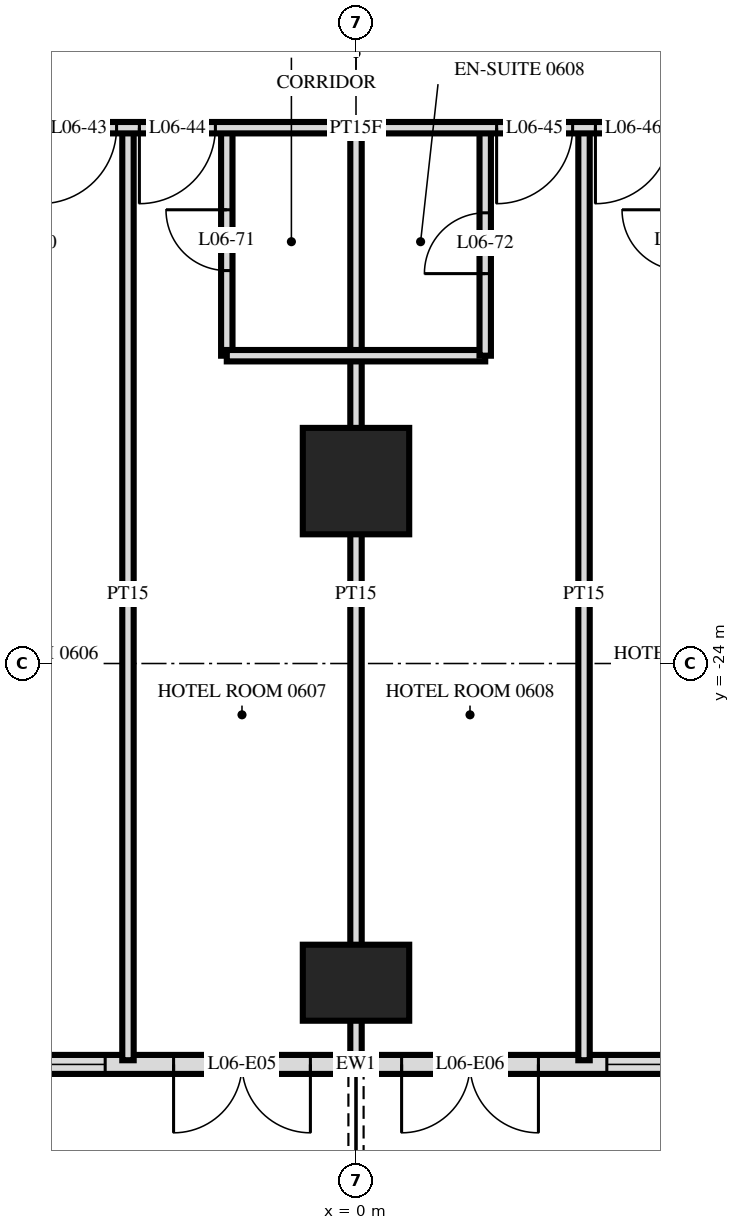
"""IFC4 building model, lengths in metres.
Left out: names, types, materials, properties, quantities, classifications, styles, units other than length and angle.
Written with IfcOpenShell. Run it as: python <this file> out.ifc"""

import sys

from ifc_helpers import new_model, si_unit, direction, frame, frame_2d, origin, origin_2d, place, context, subcontext, project, spatial, rectangle, extrude, element, fill, save


model = new_model("IFC4")
c1 = context("Model", 3, precision=1e-05, world=origin(), true_north=direction((0.0, 1.0)))
c2 = subcontext(c1, "Body", "Model", "MODEL_VIEW")
j1 = project(units=[si_unit("LENGTHUNIT", "METRE"), si_unit("PLANEANGLEUNIT", "RADIAN")], contexts=[c1])
p1 = place(None, origin())
s1 = spatial("IfcSite", under=j1, at=p1, CompositionType="ELEMENT")
p2 = place(p1, origin())
s2 = spatial("IfcBuilding", under=s1, at=p2, CompositionType="ELEMENT")
p3 = place(p2, frame((0.0, 0.0, 31.2)))
s3 = spatial("IfcBuildingStorey", under=s2, at=p3, CompositionType="ELEMENT", Elevation=31.2)
p4 = place(p3, frame((0.0, -28.2, 0.0), z_axis=(0.0, 0.0, 1.0), x_axis=(1.0, 0.0, 0.0)))
e1 = element("IfcColumn", 1, at=p4, inside=s3, PredefinedType="COLUMN", context=c2, shape_type="SweptSolid", body=[
    extrude(rectangle(XDim=1.4, YDim=1.0, at=origin_2d()), origin(), (0.0, 0.0, 1.0), 3.6),
])
p5 = place(p3, frame((0.0, -21.6, 0.0), z_axis=(0.0, 0.0, 1.0), x_axis=(1.0, 0.0, 0.0)))
e2 = element("IfcColumn", 2, at=p5, inside=s3, PredefinedType="COLUMN", context=c2, shape_type="SweptSolid", body=[
    extrude(rectangle(XDim=1.4, YDim=1.4, at=origin_2d()), origin(), (0.0, 0.0, 1.0), 3.6),
])
p6 = place(p3, frame((-28.775, -29.275, 0.0), z_axis=(0.0, 0.0, 1.0), x_axis=(1.0, 0.0, 0.0)))
e3 = element("IfcWall", 3, at=p6, inside=s3, PredefinedType="SOLIDWALL", context=c2, shape_type="SweptSolid", body=[
    extrude(rectangle(XDim=57.551, YDim=0.25, at=frame_2d((28.775, 0.0))), origin(), (0.0, 0.0, 1.0), 3.32),
])
p7 = place(p6, frame((0.575, 0.0, 0.0)))
e4 = element("IfcOpeningElement", 4, at=p7, cuts=e3, PredefinedType="OPENING", context=c2, shape_type="SweptSolid", body=[
    extrude(rectangle(XDim=1.8, YDim=2.4, at=frame_2d((0.9, 1.2))), frame((0.0, 0.135, 0.0), z_axis=(0.0, -1.0, 0.0), x_axis=(1.0, 0.0, 0.0)), (0.0, 0.0, 1.0), 0.27),
])
p8 = place(p6, frame((5.375, 0.0, 0.0)))
e5 = element("IfcOpeningElement", 5, at=p8, cuts=e3, PredefinedType="OPENING", context=c2, shape_type="SweptSolid", body=[
    extrude(rectangle(XDim=1.8, YDim=2.4, at=frame_2d((0.9, 1.2))), frame((0.0, 0.135, 0.0), z_axis=(0.0, -1.0, 0.0), x_axis=(1.0, 0.0, 0.0)), (0.0, 0.0, 1.0), 0.27),
])
p9 = place(p6, frame((8.075, 0.0, 0.3)))
e6 = element("IfcOpeningElement", 6, at=p9, cuts=e3, PredefinedType="OPENING", context=c2, shape_type="SweptSolid", body=[
    extrude(rectangle(XDim=2.4, YDim=2.1, at=frame_2d((1.2, 1.05))), frame((0.0, 0.135, 0.0), z_axis=(0.0, -1.0, 0.0), x_axis=(1.0, 0.0, 0.0)), (0.0, 0.0, 1.0), 0.27),
])
p10 = place(p6, frame((11.375, 0.0, 0.0)))
e7 = element("IfcOpeningElement", 7, at=p10, cuts=e3, PredefinedType="OPENING", context=c2, shape_type="SweptSolid", body=[
    extrude(rectangle(XDim=1.8, YDim=2.4, at=frame_2d((0.9, 1.2))), frame((0.0, 0.135, 0.0), z_axis=(0.0, -1.0, 0.0), x_axis=(1.0, 0.0, 0.0)), (0.0, 0.0, 1.0), 0.27),
])
p11 = place(p6, frame((14.075, 0.0, 0.3)))
e8 = element("IfcOpeningElement", 8, at=p11, cuts=e3, PredefinedType="OPENING", context=c2, shape_type="SweptSolid", body=[
    extrude(rectangle(XDim=2.4, YDim=2.1, at=frame_2d((1.2, 1.05))), frame((0.0, 0.135, 0.0), z_axis=(0.0, -1.0, 0.0), x_axis=(1.0, 0.0, 0.0)), (0.0, 0.0, 1.0), 0.27),
])
p12 = place(p6, frame((17.375, 0.0, 0.0)))
e9 = element("IfcOpeningElement", 9, at=p12, cuts=e3, PredefinedType="OPENING", context=c2, shape_type="SweptSolid", body=[
    extrude(rectangle(XDim=1.8, YDim=2.4, at=frame_2d((0.9, 1.2))), frame((0.0, 0.135, 0.0), z_axis=(0.0, -1.0, 0.0), x_axis=(1.0, 0.0, 0.0)), (0.0, 0.0, 1.0), 0.27),
])
p13 = place(p6, frame((20.075, 0.0, 0.3)))
e10 = element("IfcOpeningElement", 10, at=p13, cuts=e3, PredefinedType="OPENING", context=c2, shape_type="SweptSolid", body=[
    extrude(rectangle(XDim=2.4, YDim=2.1, at=frame_2d((1.2, 1.05))), frame((0.0, 0.135, 0.0), z_axis=(0.0, -1.0, 0.0), x_axis=(1.0, 0.0, 0.0)), (0.0, 0.0, 1.0), 0.27),
])
p14 = place(p6, frame((23.075, 0.0, 0.3)))
e11 = element("IfcOpeningElement", 11, at=p14, cuts=e3, PredefinedType="OPENING", context=c2, shape_type="SweptSolid", body=[
    extrude(rectangle(XDim=2.4, YDim=2.1, at=frame_2d((1.2, 1.05))), frame((0.0, 0.135, 0.0), z_axis=(0.0, -1.0, 0.0), x_axis=(1.0, 0.0, 0.0)), (0.0, 0.0, 1.0), 0.27),
])
p15 = place(p6, frame((26.375, 0.0, 0.0)))
e12 = element("IfcOpeningElement", 12, at=p15, cuts=e3, PredefinedType="OPENING", context=c2, shape_type="SweptSolid", body=[
    extrude(rectangle(XDim=1.8, YDim=2.4, at=frame_2d((0.9, 1.2))), frame((0.0, 0.135, 0.0), z_axis=(0.0, -1.0, 0.0), x_axis=(1.0, 0.0, 0.0)), (0.0, 0.0, 1.0), 0.27),
])
p16 = place(p6, frame((29.375, 0.0, 0.0)))
e13 = element("IfcOpeningElement", 13, at=p16, cuts=e3, PredefinedType="OPENING", context=c2, shape_type="SweptSolid", body=[
    extrude(rectangle(XDim=1.8, YDim=2.4, at=frame_2d((0.9, 1.2))), frame((0.0, 0.135, 0.0), z_axis=(0.0, -1.0, 0.0), x_axis=(1.0, 0.0, 0.0)), (0.0, 0.0, 1.0), 0.27),
])
p17 = place(p6, frame((32.075, 0.0, 0.3)))
e14 = element("IfcOpeningElement", 14, at=p17, cuts=e3, PredefinedType="OPENING", context=c2, shape_type="SweptSolid", body=[
    extrude(rectangle(XDim=2.4, YDim=2.1, at=frame_2d((1.2, 1.05))), frame((0.0, 0.135, 0.0), z_axis=(0.0, -1.0, 0.0), x_axis=(1.0, 0.0, 0.0)), (0.0, 0.0, 1.0), 0.27),
])
p18 = place(p6, frame((35.375, 0.0, 0.0)))
e15 = element("IfcOpeningElement", 15, at=p18, cuts=e3, PredefinedType="OPENING", context=c2, shape_type="SweptSolid", body=[
    extrude(rectangle(XDim=1.8, YDim=2.4, at=frame_2d((0.9, 1.2))), frame((0.0, 0.135, 0.0), z_axis=(0.0, -1.0, 0.0), x_axis=(1.0, 0.0, 0.0)), (0.0, 0.0, 1.0), 0.27),
])
p19 = place(p6, frame((38.075, 0.0, 0.3)))
e16 = element("IfcOpeningElement", 16, at=p19, cuts=e3, PredefinedType="OPENING", context=c2, shape_type="SweptSolid", body=[
    extrude(rectangle(XDim=2.4, YDim=2.1, at=frame_2d((1.2, 1.05))), frame((0.0, 0.135, 0.0), z_axis=(0.0, -1.0, 0.0), x_axis=(1.0, 0.0, 0.0)), (0.0, 0.0, 1.0), 0.27),
])
p20 = place(p6, frame((41.375, 0.0, 0.0)))
e17 = element("IfcOpeningElement", 17, at=p20, cuts=e3, PredefinedType="OPENING", context=c2, shape_type="SweptSolid", body=[
    extrude(rectangle(XDim=1.8, YDim=2.4, at=frame_2d((0.9, 1.2))), frame((0.0, 0.135, 0.0), z_axis=(0.0, -1.0, 0.0), x_axis=(1.0, 0.0, 0.0)), (0.0, 0.0, 1.0), 0.27),
])
p21 = place(p6, frame((44.075, 0.0, 0.3)))
e18 = element("IfcOpeningElement", 18, at=p21, cuts=e3, PredefinedType="OPENING", context=c2, shape_type="SweptSolid", body=[
    extrude(rectangle(XDim=2.4, YDim=2.1, at=frame_2d((1.2, 1.05))), frame((0.0, 0.135, 0.0), z_axis=(0.0, -1.0, 0.0), x_axis=(1.0, 0.0, 0.0)), (0.0, 0.0, 1.0), 0.27),
])
p22 = place(p6, frame((47.075, 0.0, 0.3)))
e19 = element("IfcOpeningElement", 19, at=p22, cuts=e3, PredefinedType="OPENING", context=c2, shape_type="SweptSolid", body=[
    extrude(rectangle(XDim=2.4, YDim=2.1, at=frame_2d((1.2, 1.05))), frame((0.0, 0.135, 0.0), z_axis=(0.0, -1.0, 0.0), x_axis=(1.0, 0.0, 0.0)), (0.0, 0.0, 1.0), 0.27),
])
p23 = place(p6, frame((50.375, 0.0, 0.0)))
e20 = element("IfcOpeningElement", 20, at=p23, cuts=e3, PredefinedType="OPENING", context=c2, shape_type="SweptSolid", body=[
    extrude(rectangle(XDim=1.8, YDim=2.4, at=frame_2d((0.9, 1.2))), frame((0.0, 0.135, 0.0), z_axis=(0.0, -1.0, 0.0), x_axis=(1.0, 0.0, 0.0)), (0.0, 0.0, 1.0), 0.27),
])
p24 = place(p6, frame((53.375, 0.0, 0.0)))
e21 = element("IfcOpeningElement", 21, at=p24, cuts=e3, PredefinedType="OPENING", context=c2, shape_type="SweptSolid", body=[
    extrude(rectangle(XDim=1.8, YDim=2.4, at=frame_2d((0.9, 1.2))), frame((0.0, 0.135, 0.0), z_axis=(0.0, -1.0, 0.0), x_axis=(1.0, 0.0, 0.0)), (0.0, 0.0, 1.0), 0.27),
])
p25 = place(p3, frame((3.0, -29.22, 0.0), z_axis=(0.0, 0.0, 1.0), x_axis=(0.0, 1.0, 0.0)))
e22 = element("IfcWall", 22, at=p25, inside=s3, PredefinedType="PARTITIONING", context=c2, shape_type="SweptSolid", body=[
    extrude(rectangle(XDim=12.27, YDim=0.15, at=frame_2d((6.135, 0.0))), origin(), (0.0, 0.0, 1.0), 3.32),
])
p26 = place(p3, frame((1.7, -19.95, 0.0), z_axis=(0.0, 0.0, 1.0), x_axis=(0.0, 1.0, 0.0)))
e23 = element("IfcWall", 23, at=p26, inside=s3, PredefinedType="PARTITIONING", context=c2, shape_type="SweptSolid", body=[
    extrude(rectangle(XDim=3.0, YDim=0.15, at=frame_2d((1.5, 0.0))), origin(), (0.0, 0.0, 1.0), 3.32),
])
p27 = place(p26, frame((1.08, 0.0, 0.0)))
e24 = element("IfcOpeningElement", 24, at=p27, cuts=e23, PredefinedType="OPENING", context=c2, shape_type="SweptSolid", body=[
    extrude(rectangle(XDim=0.8, YDim=2.1, at=frame_2d((0.4, 1.05))), frame((0.0, 0.085, 0.0), z_axis=(0.0, -1.0, 0.0), x_axis=(1.0, 0.0, 0.0)), (0.0, 0.0, 1.0), 0.17),
])
p28 = place(p3, frame((0.0, -29.22, 0.0), z_axis=(0.0, 0.0, 1.0), x_axis=(0.0, 1.0, 0.0)))
e25 = element("IfcWall", 25, at=p28, inside=s3, PredefinedType="PARTITIONING", context=c2, shape_type="SweptSolid", body=[
    extrude(rectangle(XDim=12.27, YDim=0.15, at=frame_2d((6.135, 0.0))), origin(), (0.0, 0.0, 1.0), 3.32),
])
p29 = place(p3, frame((-1.7, -19.95, 0.0), z_axis=(0.0, 0.0, 1.0), x_axis=(0.0, 1.0, 0.0)))
e26 = element("IfcWall", 26, at=p29, inside=s3, PredefinedType="PARTITIONING", context=c2, shape_type="SweptSolid", body=[
    extrude(rectangle(XDim=3.0, YDim=0.15, at=frame_2d((1.5, 0.0))), origin(), (0.0, 0.0, 1.0), 3.32),
])
p30 = place(p29, frame((1.12, 0.0, 0.0)))
e27 = element("IfcOpeningElement", 27, at=p30, cuts=e26, PredefinedType="OPENING", context=c2, shape_type="SweptSolid", body=[
    extrude(rectangle(XDim=0.8, YDim=2.1, at=frame_2d((0.4, 1.05))), frame((0.0, 0.085, 0.0), z_axis=(0.0, -1.0, 0.0), x_axis=(1.0, 0.0, 0.0)), (0.0, 0.0, 1.0), 0.17),
])
p31 = place(p3, frame((-3.0, -29.22, 0.0), z_axis=(0.0, 0.0, 1.0), x_axis=(0.0, 1.0, 0.0)))
e28 = element("IfcWall", 28, at=p31, inside=s3, PredefinedType="PARTITIONING", context=c2, shape_type="SweptSolid", body=[
    extrude(rectangle(XDim=12.27, YDim=0.15, at=frame_2d((6.135, 0.0))), origin(), (0.0, 0.0, 1.0), 3.32),
])
p32 = place(p3, frame((-1.7, -19.95, 0.0), z_axis=(0.0, 0.0, 1.0), x_axis=(1.0, 0.0, 0.0)))
e29 = element("IfcWall", 29, at=p32, inside=s3, PredefinedType="PARTITIONING", context=c2, shape_type="SweptSolid", body=[
    extrude(rectangle(XDim=3.4, YDim=0.15, at=frame_2d((1.7, 0.0))), origin(), (0.0, 0.0, 1.0), 3.32),
])
p33 = place(p3, frame((-33.12, -16.95, 0.0), z_axis=(0.0, 0.0, 1.0), x_axis=(1.0, 0.0, 0.0)))
e30 = element("IfcWall", 30, at=p33, inside=s3, PredefinedType="PARTITIONING", context=c2, shape_type="SweptSolid", body=[
    extrude(rectangle(XDim=66.24, YDim=0.15, at=frame_2d((33.12, 0.0))), origin(), (0.0, 0.0, 1.0), 3.32),
])
p34 = place(p33, frame((9.27, 0.0, 0.0)))
e31 = element("IfcOpeningElement", 31, at=p34, cuts=e30, PredefinedType="OPENING", context=c2, shape_type="SweptSolid", body=[
    extrude(rectangle(XDim=1.0, YDim=2.1, at=frame_2d((0.5, 1.05))), frame((0.0, 0.085, 0.0), z_axis=(0.0, -1.0, 0.0), x_axis=(1.0, 0.0, 0.0)), (0.0, 0.0, 1.0), 0.17),
])
p35 = place(p33, frame((13.97, 0.0, 0.0)))
e32 = element("IfcOpeningElement", 32, at=p35, cuts=e30, PredefinedType="OPENING", context=c2, shape_type="SweptSolid", body=[
    extrude(rectangle(XDim=1.0, YDim=2.1, at=frame_2d((0.5, 1.05))), frame((0.0, 0.085, 0.0), z_axis=(0.0, -1.0, 0.0), x_axis=(1.0, 0.0, 0.0)), (0.0, 0.0, 1.0), 0.17),
])
p36 = place(p33, frame((15.27, 0.0, 0.0)))
e33 = element("IfcOpeningElement", 33, at=p36, cuts=e30, PredefinedType="OPENING", context=c2, shape_type="SweptSolid", body=[
    extrude(rectangle(XDim=1.0, YDim=2.1, at=frame_2d((0.5, 1.05))), frame((0.0, 0.085, 0.0), z_axis=(0.0, -1.0, 0.0), x_axis=(1.0, 0.0, 0.0)), (0.0, 0.0, 1.0), 0.17),
])
p37 = place(p33, frame((19.97, 0.0, 0.0)))
e34 = element("IfcOpeningElement", 34, at=p37, cuts=e30, PredefinedType="OPENING", context=c2, shape_type="SweptSolid", body=[
    extrude(rectangle(XDim=1.0, YDim=2.1, at=frame_2d((0.5, 1.05))), frame((0.0, 0.085, 0.0), z_axis=(0.0, -1.0, 0.0), x_axis=(1.0, 0.0, 0.0)), (0.0, 0.0, 1.0), 0.17),
])
p38 = place(p33, frame((22.27, 0.0, 0.0)))
e35 = element("IfcOpeningElement", 35, at=p38, cuts=e30, PredefinedType="OPENING", context=c2, shape_type="SweptSolid", body=[
    extrude(rectangle(XDim=1.0, YDim=2.1, at=frame_2d((0.5, 1.05))), frame((0.0, 0.085, 0.0), z_axis=(0.0, -1.0, 0.0), x_axis=(1.0, 0.0, 0.0)), (0.0, 0.0, 1.0), 0.17),
])
p39 = place(p33, frame((28.97, 0.0, 0.0)))
e36 = element("IfcOpeningElement", 36, at=p39, cuts=e30, PredefinedType="OPENING", context=c2, shape_type="SweptSolid", body=[
    extrude(rectangle(XDim=1.0, YDim=2.1, at=frame_2d((0.5, 1.05))), frame((0.0, 0.085, 0.0), z_axis=(0.0, -1.0, 0.0), x_axis=(1.0, 0.0, 0.0)), (0.0, 0.0, 1.0), 0.17),
])
p40 = place(p33, frame((30.27, 0.0, 0.0)))
e37 = element("IfcOpeningElement", 37, at=p40, cuts=e30, PredefinedType="OPENING", context=c2, shape_type="SweptSolid", body=[
    extrude(rectangle(XDim=1.0, YDim=2.1, at=frame_2d((0.5, 1.05))), frame((0.0, 0.085, 0.0), z_axis=(0.0, -1.0, 0.0), x_axis=(1.0, 0.0, 0.0)), (0.0, 0.0, 1.0), 0.17),
])
p41 = place(p33, frame((34.97, 0.0, 0.0)))
e38 = element("IfcOpeningElement", 38, at=p41, cuts=e30, PredefinedType="OPENING", context=c2, shape_type="SweptSolid", body=[
    extrude(rectangle(XDim=1.0, YDim=2.1, at=frame_2d((0.5, 1.05))), frame((0.0, 0.085, 0.0), z_axis=(0.0, -1.0, 0.0), x_axis=(1.0, 0.0, 0.0)), (0.0, 0.0, 1.0), 0.17),
])
p42 = place(p33, frame((36.27, 0.0, 0.0)))
e39 = element("IfcOpeningElement", 39, at=p42, cuts=e30, PredefinedType="OPENING", context=c2, shape_type="SweptSolid", body=[
    extrude(rectangle(XDim=1.0, YDim=2.1, at=frame_2d((0.5, 1.05))), frame((0.0, 0.085, 0.0), z_axis=(0.0, -1.0, 0.0), x_axis=(1.0, 0.0, 0.0)), (0.0, 0.0, 1.0), 0.17),
])
p43 = place(p33, frame((40.97, 0.0, 0.0)))
e40 = element("IfcOpeningElement", 40, at=p43, cuts=e30, PredefinedType="OPENING", context=c2, shape_type="SweptSolid", body=[
    extrude(rectangle(XDim=1.0, YDim=2.1, at=frame_2d((0.5, 1.05))), frame((0.0, 0.085, 0.0), z_axis=(0.0, -1.0, 0.0), x_axis=(1.0, 0.0, 0.0)), (0.0, 0.0, 1.0), 0.17),
])
p44 = place(p33, frame((42.27, 0.0, 0.0)))
e41 = element("IfcOpeningElement", 41, at=p44, cuts=e30, PredefinedType="OPENING", context=c2, shape_type="SweptSolid", body=[
    extrude(rectangle(XDim=1.0, YDim=2.1, at=frame_2d((0.5, 1.05))), frame((0.0, 0.085, 0.0), z_axis=(0.0, -1.0, 0.0), x_axis=(1.0, 0.0, 0.0)), (0.0, 0.0, 1.0), 0.17),
])
p45 = place(p33, frame((46.97, 0.0, 0.0)))
e42 = element("IfcOpeningElement", 42, at=p45, cuts=e30, PredefinedType="OPENING", context=c2, shape_type="SweptSolid", body=[
    extrude(rectangle(XDim=1.0, YDim=2.1, at=frame_2d((0.5, 1.05))), frame((0.0, 0.085, 0.0), z_axis=(0.0, -1.0, 0.0), x_axis=(1.0, 0.0, 0.0)), (0.0, 0.0, 1.0), 0.17),
])
p46 = place(p33, frame((48.27, 0.0, 0.0)))
e43 = element("IfcOpeningElement", 43, at=p46, cuts=e30, PredefinedType="OPENING", context=c2, shape_type="SweptSolid", body=[
    extrude(rectangle(XDim=1.0, YDim=2.1, at=frame_2d((0.5, 1.05))), frame((0.0, 0.085, 0.0), z_axis=(0.0, -1.0, 0.0), x_axis=(1.0, 0.0, 0.0)), (0.0, 0.0, 1.0), 0.17),
])
p47 = place(p33, frame((52.97, 0.0, 0.0)))
e44 = element("IfcOpeningElement", 44, at=p47, cuts=e30, PredefinedType="OPENING", context=c2, shape_type="SweptSolid", body=[
    extrude(rectangle(XDim=1.0, YDim=2.1, at=frame_2d((0.5, 1.05))), frame((0.0, 0.085, 0.0), z_axis=(0.0, -1.0, 0.0), x_axis=(1.0, 0.0, 0.0)), (0.0, 0.0, 1.0), 0.17),
])
p48 = place(p33, frame((54.27, 0.0, 0.0)))
e45 = element("IfcOpeningElement", 45, at=p48, cuts=e30, PredefinedType="OPENING", context=c2, shape_type="SweptSolid", body=[
    extrude(rectangle(XDim=1.0, YDim=2.1, at=frame_2d((0.5, 1.05))), frame((0.0, 0.085, 0.0), z_axis=(0.0, -1.0, 0.0), x_axis=(1.0, 0.0, 0.0)), (0.0, 0.0, 1.0), 0.17),
])
p49 = place(p33, frame((4.4, 0.0, 0.0)))
e46 = element("IfcOpeningElement", 46, at=p49, cuts=e30, PredefinedType="OPENING", context=c2, shape_type="SweptSolid", body=[
    extrude(rectangle(XDim=1.0, YDim=2.1, at=frame_2d((0.5, 1.05))), frame((0.0, 0.085, 0.0), z_axis=(0.0, -1.0, 0.0), x_axis=(1.0, 0.0, 0.0)), (0.0, 0.0, 1.0), 0.17),
])
p50 = place(p33, frame((60.8, 0.0, 0.0)))
e47 = element("IfcOpeningElement", 47, at=p50, cuts=e30, PredefinedType="OPENING", context=c2, shape_type="SweptSolid", body=[
    extrude(rectangle(XDim=1.0, YDim=2.1, at=frame_2d((0.5, 1.05))), frame((0.0, 0.085, 0.0), z_axis=(0.0, -1.0, 0.0), x_axis=(1.0, 0.0, 0.0)), (0.0, 0.0, 1.0), 0.17),
])
p51 = place(p14, origin())
e48 = element("IfcWindow", 48, at=p51, inside=s3, PartitioningType="SINGLE_PANEL", PredefinedType="WINDOW", context=c2, shape_type="SweptSolid", body=[
    extrude(rectangle(XDim=2.4, YDim=2.1, at=frame_2d((1.2, 1.05))), frame((0.0, 0.03, 0.0), z_axis=(0.0, -1.0, 0.0), x_axis=(1.0, 0.0, 0.0)), (0.0, 0.0, 1.0), 0.06),
])
fill(e11, e48)
p52 = place(p15, frame((0.9, 0.0, 0.0), z_axis=(0.0, 0.0, 1.0), x_axis=(-1.0, 0.0, 0.0)))
e49 = element("IfcDoor", 49, at=p52, inside=s3, OperationType="DOUBLE_DOOR_SINGLE_SWING", PredefinedType="DOOR", context=c2, shape_type="SweptSolid", body=[
    extrude(rectangle(XDim=1.8, YDim=2.4, at=frame_2d((0.0, 1.2))), frame((0.0, -0.025, 0.0), z_axis=(0.0, 1.0, 0.0), x_axis=(-1.0, 0.0, 0.0)), (0.0, 0.0, 1.0), 0.05),
])
fill(e12, e49)
p53 = place(p16, frame((0.9, 0.0, 0.0), z_axis=(0.0, 0.0, 1.0), x_axis=(-1.0, 0.0, 0.0)))
e50 = element("IfcDoor", 50, at=p53, inside=s3, OperationType="DOUBLE_DOOR_SINGLE_SWING", PredefinedType="DOOR", context=c2, shape_type="SweptSolid", body=[
    extrude(rectangle(XDim=1.8, YDim=2.4, at=frame_2d((0.0, 1.2))), frame((0.0, -0.025, 0.0), z_axis=(0.0, 1.0, 0.0), x_axis=(-1.0, 0.0, 0.0)), (0.0, 0.0, 1.0), 0.05),
])
fill(e13, e50)
p54 = place(p17, origin())
e51 = element("IfcWindow", 51, at=p54, inside=s3, PartitioningType="SINGLE_PANEL", PredefinedType="WINDOW", context=c2, shape_type="SweptSolid", body=[
    extrude(rectangle(XDim=2.4, YDim=2.1, at=frame_2d((1.2, 1.05))), frame((0.0, 0.03, 0.0), z_axis=(0.0, -1.0, 0.0), x_axis=(1.0, 0.0, 0.0)), (0.0, 0.0, 1.0), 0.06),
])
fill(e14, e51)
p55 = place(p39, frame((0.5, 0.0, 0.0), z_axis=(0.0, 0.0, 1.0), x_axis=(-1.0, 0.0, 0.0)))
e52 = element("IfcDoor", 52, at=p55, inside=s3, OperationType="SINGLE_SWING_LEFT", PredefinedType="DOOR", context=c2, shape_type="SweptSolid", body=[
    extrude(rectangle(XDim=1.0, YDim=2.1, at=frame_2d((0.0, 1.05))), frame((0.0, -0.025, 0.0), z_axis=(0.0, 1.0, 0.0), x_axis=(-1.0, 0.0, 0.0)), (0.0, 0.0, 1.0), 0.05),
])
fill(e36, e52)
p56 = place(p40, frame((0.5, 0.0, 0.0), z_axis=(0.0, 0.0, 1.0), x_axis=(-1.0, 0.0, 0.0)))
e53 = element("IfcDoor", 53, at=p56, inside=s3, OperationType="SINGLE_SWING_LEFT", PredefinedType="DOOR", context=c2, shape_type="SweptSolid", body=[
    extrude(rectangle(XDim=1.0, YDim=2.1, at=frame_2d((0.0, 1.05))), frame((0.0, -0.025, 0.0), z_axis=(0.0, 1.0, 0.0), x_axis=(-1.0, 0.0, 0.0)), (0.0, 0.0, 1.0), 0.05),
])
fill(e37, e53)
p57 = place(p41, frame((0.5, 0.0, 0.0), z_axis=(0.0, 0.0, 1.0), x_axis=(-1.0, 0.0, 0.0)))
e54 = element("IfcDoor", 54, at=p57, inside=s3, OperationType="SINGLE_SWING_LEFT", PredefinedType="DOOR", context=c2, shape_type="SweptSolid", body=[
    extrude(rectangle(XDim=1.0, YDim=2.1, at=frame_2d((0.0, 1.05))), frame((0.0, -0.025, 0.0), z_axis=(0.0, 1.0, 0.0), x_axis=(-1.0, 0.0, 0.0)), (0.0, 0.0, 1.0), 0.05),
])
fill(e38, e54)
p58 = place(p42, frame((0.5, 0.0, 0.0), z_axis=(0.0, 0.0, 1.0), x_axis=(-1.0, 0.0, 0.0)))
e55 = element("IfcDoor", 55, at=p58, inside=s3, OperationType="SINGLE_SWING_LEFT", PredefinedType="DOOR", context=c2, shape_type="SweptSolid", body=[
    extrude(rectangle(XDim=1.0, YDim=2.1, at=frame_2d((0.0, 1.05))), frame((0.0, -0.025, 0.0), z_axis=(0.0, 1.0, 0.0), x_axis=(-1.0, 0.0, 0.0)), (0.0, 0.0, 1.0), 0.05),
])
fill(e39, e55)
p59 = place(p30, origin())
e56 = element("IfcDoor", 56, at=p59, inside=s3, OperationType="SINGLE_SWING_LEFT", PredefinedType="DOOR", context=c2, shape_type="SweptSolid", body=[
    extrude(rectangle(XDim=0.8, YDim=2.1, at=frame_2d((0.4, 1.05))), frame((0.0, 0.025, 0.0), z_axis=(0.0, -1.0, 0.0), x_axis=(1.0, 0.0, 0.0)), (0.0, 0.0, 1.0), 0.05),
])
fill(e27, e56)
p60 = place(p27, origin())
e57 = element("IfcDoor", 57, at=p60, inside=s3, OperationType="SINGLE_SWING_RIGHT", PredefinedType="DOOR", context=c2, shape_type="SweptSolid", body=[
    extrude(rectangle(XDim=0.8, YDim=2.1, at=frame_2d((0.4, 1.05))), frame((0.0, 0.025, 0.0), z_axis=(0.0, -1.0, 0.0), x_axis=(1.0, 0.0, 0.0)), (0.0, 0.0, 1.0), 0.05),
])
fill(e24, e57)
save(model, sys.argv[1])
